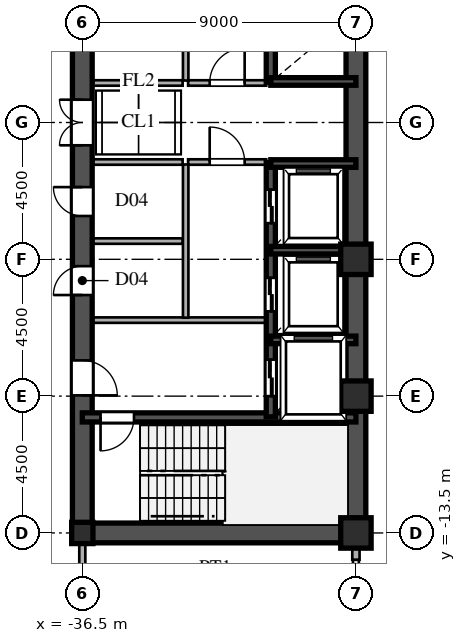
"""IFC4 building model, lengths in metres.
Left out: names, types, materials, properties, quantities, classifications, styles, units other than length and angle.
Written with IfcOpenShell. Run it as: python <this file> out.ifc"""

import sys

from ifc_helpers import new_model, si_unit, direction, frame, frame_2d, origin, origin_2d, place, context, subcontext, project, spatial, rectangle, hollow_rectangle, i_section, extrude, source, transform, mapped, element, fill, save


model = new_model("IFC4")
c1 = context("Model", 3, precision=1e-05, world=origin(), true_north=direction((0.0, 1.0)))
c2 = subcontext(c1, "Body", "Model", "MODEL_VIEW")
j1 = project(units=[si_unit("LENGTHUNIT", "METRE"), si_unit("PLANEANGLEUNIT", "RADIAN")], contexts=[c1])
p1 = place(None, origin())
s1 = spatial("IfcSite", under=j1, at=p1, CompositionType="ELEMENT")
p2 = place(p1, origin())
s2 = spatial("IfcBuilding", under=s1, at=p2, CompositionType="ELEMENT")
p3 = place(p2, frame((0.0, 0.0, 114.0)))
s3 = spatial("IfcBuildingStorey", under=s2, at=p3, CompositionType="ELEMENT", Elevation=114.0)
m1 = source(origin(), c2, "Body", "SweptSolid", [
    extrude(hollow_rectangle(XDim=1.0, YDim=1.0, WallThickness=0.042, at=origin_2d()), origin(), (0.0, 0.0, 1.0), 3.6),
])
for number, where, z_axis, x_axis in (
    (1, (-27.5, -13.5, 0.0), (0.0, 0.0, 1.0), (1.0, 0.0, 0.0)),
    (2, (-27.5, -9.0, 0.0), (0.0, 0.0, 1.0), (1.0, 0.0, 0.0)),
    (3, (-27.5, -4.5, 0.0), (0.0, 0.0, 1.0), (1.0, 0.0, 0.0)),
):
    element("IfcColumn", number, at=place(p3, frame(where, z_axis=z_axis, x_axis=x_axis)), inside=s3, PredefinedType="COLUMN", context=c2, shape_type="MappedRepresentation", body=[
        mapped(m1, transform((0.0, 0.0, 0.0), scale=1.0)),
    ])
m2 = source(origin(), c2, "Body", "SweptSolid", [
    extrude(i_section(OverallWidth=0.7, OverallDepth=0.7, WebThickness=0.028, FlangeThickness=0.045, at=origin_2d()), origin(), (0.0, 0.0, 1.0), 3.6),
])
p4 = place(p3, frame((-36.5, -13.5, 0.0), z_axis=(0.0, 0.0, 1.0), x_axis=(1.0, 0.0, 0.0)))
e4 = element("IfcColumn", 4, at=p4, inside=s3, PredefinedType="COLUMN", context=c2, shape_type="MappedRepresentation", body=[
    mapped(m2, transform((0.0, 0.0, 0.0), scale=1.0)),
])
p5 = place(p3, frame((-27.5, -14.38, 0.0), z_axis=(0.0, 0.0, 1.0), x_axis=(0.0, 1.0, 0.0)))
e5 = element("IfcWall", 5, at=p5, inside=s3, PredefinedType="SOLIDWALL", context=c2, shape_type="SweptSolid", body=[
    extrude(rectangle(XDim=0.55, YDim=0.24, at=frame_2d((0.275, 0.0))), origin(), (0.0, 0.0, 1.0), 2.88),
])
for number, where, z_axis, x_axis in (
    (6, (-27.5, -13.5, 0.0), (0.0, 0.0, 1.0), (0.0, 1.0, 0.0)),
    (7, (-27.5, 1.3, 0.0), (0.0, 0.0, 1.0), (0.0, 1.0, 0.0)),
):
    element("IfcWall", number, at=place(p3, frame(where, z_axis=z_axis, x_axis=x_axis)), inside=s3, PredefinedType="SHEAR", context=c2, shape_type="SweptSolid", body=[
        extrude(rectangle(XDim=12.2, YDim=0.65, at=frame_2d((6.1, 0.0))), origin(), (0.0, 0.0, 1.0), 3.38),
    ])
p6 = place(p3, frame((-27.5, -1.3, 0.0), z_axis=(0.0, 0.0, 1.0), x_axis=(0.0, 1.0, 0.0)))
e8 = element("IfcWall", 8, at=p6, inside=s3, PredefinedType="SHEAR", context=c2, shape_type="SweptSolid", body=[
    extrude(rectangle(XDim=2.6, YDim=0.65, at=frame_2d((1.3, 0.0))), origin(), (0.0, 0.0, 1.0), 3.38),
])
p7 = place(p3, frame((-36.5, -13.5, 0.0), z_axis=(0.0, 0.0, 1.0), x_axis=(1.0, 0.0, 0.0)))
e9 = element("IfcWall", 9, at=p7, inside=s3, PredefinedType="SHEAR", context=c2, shape_type="SweptSolid", body=[
    extrude(rectangle(XDim=9.0, YDim=0.65, at=frame_2d((4.5, 0.0))), origin(), (0.0, 0.0, 1.0), 3.38),
])
p8 = place(p3, frame((-36.5, -13.65, 0.0), z_axis=(0.0, 0.0, 1.0), x_axis=(0.0, 1.0, 0.0)))
e10 = element("IfcWall", 10, at=p8, inside=s3, PredefinedType="SHEAR", context=c2, shape_type="SweptSolid", body=[
    extrude(rectangle(XDim=7.15, YDim=0.65, at=frame_2d((3.575, 0.0))), origin(), (0.0, 0.0, 1.0), 3.38),
])
p9 = place(p8, frame((4.675, 0.0, 0.0)))
e11 = element("IfcOpeningElement", 11, at=p9, cuts=e10, PredefinedType="OPENING", context=c2, shape_type="SweptSolid", body=[
    extrude(rectangle(XDim=1.15, YDim=2.2, at=frame_2d((0.575, 1.1))), frame((0.0, 0.335, 0.0), z_axis=(0.0, -1.0, 0.0), x_axis=(1.0, 0.0, 0.0)), (0.0, 0.0, 1.0), 0.67),
])
p10 = place(p3, frame((-36.5, -1.3, 0.0), z_axis=(0.0, 0.0, 1.0), x_axis=(0.0, 1.0, 0.0)))
e12 = element("IfcWall", 12, at=p10, inside=s3, PredefinedType="SHEAR", context=c2, shape_type="SweptSolid", body=[
    extrude(rectangle(XDim=2.6, YDim=0.65, at=frame_2d((1.3, 0.0))), origin(), (0.0, 0.0, 1.0), 3.38),
])
p11 = place(p10, frame((0.55, 0.0, 0.0)))
e13 = element("IfcOpeningElement", 13, at=p11, cuts=e12, PredefinedType="OPENING", context=c2, shape_type="SweptSolid", body=[
    extrude(rectangle(XDim=1.5, YDim=2.3, at=frame_2d((0.75, 1.15))), frame((0.0, 0.335, 0.0), z_axis=(0.0, -1.0, 0.0), x_axis=(1.0, 0.0, 0.0)), (0.0, 0.0, 1.0), 0.67),
])
p12 = place(p3, frame((-36.5, -6.5, 0.0), z_axis=(0.0, 0.0, 1.0), x_axis=(0.0, 1.0, 0.0)))
e14 = element("IfcWall", 14, at=p12, inside=s3, PredefinedType="SHEAR", context=c2, shape_type="SweptSolid", body=[
    extrude(rectangle(XDim=2.6, YDim=0.65, at=frame_2d((1.3, 0.0))), origin(), (0.0, 0.0, 1.0), 3.38),
])
p13 = place(p12, frame((0.825, 0.0, 0.0)))
e15 = element("IfcOpeningElement", 15, at=p13, cuts=e14, PredefinedType="OPENING", context=c2, shape_type="SweptSolid", body=[
    extrude(rectangle(XDim=0.95, YDim=2.15, at=frame_2d((0.475, 1.075))), frame((0.0, 0.335, 0.0), z_axis=(0.0, -1.0, 0.0), x_axis=(1.0, 0.0, 0.0)), (0.0, 0.0, 1.0), 0.67),
])
p14 = place(p3, frame((-36.5, -3.9, 0.0), z_axis=(0.0, 0.0, 1.0), x_axis=(0.0, 1.0, 0.0)))
e16 = element("IfcWall", 16, at=p14, inside=s3, PredefinedType="SHEAR", context=c2, shape_type="SweptSolid", body=[
    extrude(rectangle(XDim=2.6, YDim=0.65, at=frame_2d((1.3, 0.0))), origin(), (0.0, 0.0, 1.0), 3.38),
])
p15 = place(p14, frame((0.825, 0.0, 0.0)))
e17 = element("IfcOpeningElement", 17, at=p15, cuts=e16, PredefinedType="OPENING", context=c2, shape_type="SweptSolid", body=[
    extrude(rectangle(XDim=0.95, YDim=2.15, at=frame_2d((0.475, 1.075))), frame((0.0, 0.335, 0.0), z_axis=(0.0, -1.0, 0.0), x_axis=(1.0, 0.0, 0.0)), (0.0, 0.0, 1.0), 0.67),
])
p16 = place(p3, frame((-36.5, 1.3, 0.0), z_axis=(0.0, 0.0, 1.0), x_axis=(0.0, 1.0, 0.0)))
e18 = element("IfcWall", 18, at=p16, inside=s3, PredefinedType="SHEAR", context=c2, shape_type="SweptSolid", body=[
    extrude(rectangle(XDim=3.45, YDim=0.65, at=frame_2d((1.725, 0.0))), origin(), (0.0, 0.0, 1.0), 3.38),
])
p17 = place(p16, frame((1.25, 0.0, 0.0)))
e19 = element("IfcOpeningElement", 19, at=p17, cuts=e18, PredefinedType="OPENING", context=c2, shape_type="SweptSolid", body=[
    extrude(rectangle(XDim=0.95, YDim=2.15, at=frame_2d((0.475, 1.075))), frame((0.0, 0.335, 0.0), z_axis=(0.0, -1.0, 0.0), x_axis=(1.0, 0.0, 0.0)), (0.0, 0.0, 1.0), 0.67),
])
p18 = place(p3, frame((-36.5, -9.7, 0.0), z_axis=(0.0, 0.0, 1.0), x_axis=(1.0, 0.0, 0.0)))
e20 = element("IfcWall", 20, at=p18, inside=s3, PredefinedType="SHEAR", context=c2, shape_type="SweptSolid", body=[
    extrude(rectangle(XDim=9.0, YDim=0.3, at=frame_2d((4.5, 0.0))), origin(), (0.0, 0.0, 1.0), 3.38),
])
p19 = place(p18, frame((0.6, 0.0, 0.0)))
e21 = element("IfcOpeningElement", 21, at=p19, cuts=e20, PredefinedType="OPENING", context=c2, shape_type="SweptSolid", body=[
    extrude(rectangle(XDim=1.1, YDim=2.2, at=frame_2d((0.55, 1.1))), frame((0.0, 0.16, 0.0), z_axis=(0.0, -1.0, 0.0), x_axis=(1.0, 0.0, 0.0)), (0.0, 0.0, 1.0), 0.32),
])
for number, where, z_axis, x_axis in (
    (22, (-30.3, -7.15, 0.0), (0.0, 0.0, 1.0), (1.0, 0.0, 0.0)),
    (23, (-30.3, -4.2, 0.0), (0.0, 0.0, 1.0), (1.0, 0.0, 0.0)),
    (24, (-30.3, -1.35, 0.0), (0.0, 0.0, 1.0), (1.0, 0.0, 0.0)),
    (25, (-30.3, 1.35, 0.0), (0.0, 0.0, 1.0), (1.0, 0.0, 0.0)),
):
    element("IfcWall", number, at=place(p3, frame(where, z_axis=z_axis, x_axis=x_axis)), inside=s3, PredefinedType="SHEAR", context=c2, shape_type="SweptSolid", body=[
        extrude(rectangle(XDim=2.8, YDim=0.25, at=frame_2d((1.4, 0.0))), origin(), (0.0, 0.0, 1.0), 3.38),
    ])
p20 = place(p3, frame((-30.3, -9.68, 0.0), z_axis=(0.0, 0.0, 1.0), x_axis=(0.0, 1.0, 0.0)))
e26 = element("IfcWall", 26, at=p20, inside=s3, PredefinedType="SHEAR", context=c2, shape_type="SweptSolid", body=[
    extrude(rectangle(XDim=2.56, YDim=0.3, at=frame_2d((1.28, 0.0))), origin(), (0.0, 0.0, 1.0), 3.38),
])
p21 = place(p20, frame((0.68, 0.0, 0.0)))
e27 = element("IfcOpeningElement", 27, at=p21, cuts=e26, PredefinedType="OPENING", context=c2, shape_type="SweptSolid", body=[
    extrude(rectangle(XDim=1.2, YDim=2.25, at=frame_2d((0.6, 1.125))), frame((0.0, 0.16, 0.0), z_axis=(0.0, -1.0, 0.0), x_axis=(1.0, 0.0, 0.0)), (0.0, 0.0, 1.0), 0.32),
])
p22 = place(p3, frame((-30.3, -7.12, 0.0), z_axis=(0.0, 0.0, 1.0), x_axis=(0.0, 1.0, 0.0)))
e28 = element("IfcWall", 28, at=p22, inside=s3, PredefinedType="SHEAR", context=c2, shape_type="SweptSolid", body=[
    extrude(rectangle(XDim=2.92, YDim=0.3, at=frame_2d((1.46, 0.0))), origin(), (0.0, 0.0, 1.0), 3.38),
])
p23 = place(p22, frame((0.91, 0.0, 0.0)))
e29 = element("IfcOpeningElement", 29, at=p23, cuts=e28, PredefinedType="OPENING", context=c2, shape_type="SweptSolid", body=[
    extrude(rectangle(XDim=1.1, YDim=2.2, at=frame_2d((0.55, 1.1))), frame((0.0, 0.16, 0.0), z_axis=(0.0, -1.0, 0.0), x_axis=(1.0, 0.0, 0.0)), (0.0, 0.0, 1.0), 0.32),
])
p24 = place(p3, frame((-30.3, -4.2, 0.0), z_axis=(0.0, 0.0, 1.0), x_axis=(0.0, 1.0, 0.0)))
e30 = element("IfcWall", 30, at=p24, inside=s3, PredefinedType="SHEAR", context=c2, shape_type="SweptSolid", body=[
    extrude(rectangle(XDim=2.88, YDim=0.3, at=frame_2d((1.44, 0.0))), origin(), (0.0, 0.0, 1.0), 3.38),
])
p25 = place(p24, frame((0.89, 0.0, 0.0)))
e31 = element("IfcOpeningElement", 31, at=p25, cuts=e30, PredefinedType="OPENING", context=c2, shape_type="SweptSolid", body=[
    extrude(rectangle(XDim=1.1, YDim=2.2, at=frame_2d((0.55, 1.1))), frame((0.0, 0.16, 0.0), z_axis=(0.0, -1.0, 0.0), x_axis=(1.0, 0.0, 0.0)), (0.0, 0.0, 1.0), 0.32),
])
p26 = place(p3, frame((-30.3, 1.32, 0.0), z_axis=(0.0, 0.0, 1.0), x_axis=(0.0, 1.0, 0.0)))
e32 = element("IfcWall", 32, at=p26, inside=s3, PredefinedType="SHEAR", context=c2, shape_type="SweptSolid", body=[
    extrude(rectangle(XDim=2.28, YDim=0.3, at=frame_2d((1.14, 0.0))), origin(), (0.0, 0.0, 1.0), 3.38),
])
p27 = place(p3, frame((-36.15, -6.5, 0.0), z_axis=(0.0, 0.0, 1.0), x_axis=(1.0, 0.0, 0.0)))
e33 = element("IfcWall", 33, at=p27, inside=s3, PredefinedType="PARTITIONING", context=c2, shape_type="SweptSolid", body=[
    extrude(rectangle(XDim=5.7, YDim=0.18, at=frame_2d((2.85, 0.0))), origin(), (0.0, 0.0, 1.0), 3.38),
])
p28 = place(p3, frame((-33.1, -6.42, 0.0), z_axis=(0.0, 0.0, 1.0), x_axis=(0.0, 1.0, 0.0)))
e34 = element("IfcWall", 34, at=p28, inside=s3, PredefinedType="PARTITIONING", context=c2, shape_type="SweptSolid", body=[
    extrude(rectangle(XDim=5.04, YDim=0.18, at=frame_2d((2.52, 0.0))), origin(), (0.0, 0.0, 1.0), 3.38),
])
p29 = place(p3, frame((-33.1, 1.38, 0.0), z_axis=(0.0, 0.0, 1.0), x_axis=(0.0, 1.0, 0.0)))
e35 = element("IfcWall", 35, at=p29, inside=s3, PredefinedType="PARTITIONING", context=c2, shape_type="SweptSolid", body=[
    extrude(rectangle(XDim=6.74, YDim=0.18, at=frame_2d((3.37, 0.0))), origin(), (0.0, 0.0, 1.0), 3.38),
])
p30 = place(p3, frame((-33.02, -1.3, 0.0), z_axis=(0.0, 0.0, 1.0), x_axis=(1.0, 0.0, 0.0)))
e36 = element("IfcWall", 36, at=p30, inside=s3, PredefinedType="PARTITIONING", context=c2, shape_type="SweptSolid", body=[
    extrude(rectangle(XDim=2.57, YDim=0.18, at=frame_2d((1.285, 0.0))), origin(), (0.0, 0.0, 1.0), 3.38),
])
p31 = place(p30, frame((0.71, 0.0, 0.0)))
e37 = element("IfcOpeningElement", 37, at=p31, cuts=e36, PredefinedType="OPENING", context=c2, shape_type="SweptSolid", body=[
    extrude(rectangle(XDim=1.15, YDim=2.2, at=frame_2d((0.575, 1.1))), frame((0.0, 0.1, 0.0), z_axis=(0.0, -1.0, 0.0), x_axis=(1.0, 0.0, 0.0)), (0.0, 0.0, 1.0), 0.2),
])
p32 = place(p3, frame((-33.02, 1.3, 0.0), z_axis=(0.0, 0.0, 1.0), x_axis=(1.0, 0.0, 0.0)))
e38 = element("IfcWall", 38, at=p32, inside=s3, PredefinedType="PARTITIONING", context=c2, shape_type="SweptSolid", body=[
    extrude(rectangle(XDim=2.57, YDim=0.18, at=frame_2d((1.285, 0.0))), origin(), (0.0, 0.0, 1.0), 3.38),
])
p33 = place(p32, frame((0.71, 0.0, 0.0)))
e39 = element("IfcOpeningElement", 39, at=p33, cuts=e38, PredefinedType="OPENING", context=c2, shape_type="SweptSolid", body=[
    extrude(rectangle(XDim=1.15, YDim=2.2, at=frame_2d((0.575, 1.1))), frame((0.0, 0.1, 0.0), z_axis=(0.0, -1.0, 0.0), x_axis=(1.0, 0.0, 0.0)), (0.0, 0.0, 1.0), 0.2),
])
for number, where, z_axis, x_axis in (
    (40, (-36.15, -1.3, 0.0), (0.0, 0.0, 1.0), (1.0, 0.0, 0.0)),
    (41, (-36.15, 1.3, 0.0), (0.0, 0.0, 1.0), (1.0, 0.0, 0.0)),
    (42, (-36.15, -3.9, 0.0), (0.0, 0.0, 1.0), (1.0, 0.0, 0.0)),
):
    element("IfcWall", number, at=place(p3, frame(where, z_axis=z_axis, x_axis=x_axis)), inside=s3, PredefinedType="PARTITIONING", context=c2, shape_type="SweptSolid", body=[
        extrude(rectangle(XDim=2.95, YDim=0.18, at=frame_2d((1.475, 0.0))), origin(), (0.0, 0.0, 1.0), 3.38),
    ])
p34 = place(p3, frame((-36.5, -15.515, 0.0), z_axis=(0.0, 0.0, 1.0), x_axis=(0.0, 1.0, 0.0)))
e43 = element("IfcWall", 43, at=p34, inside=s3, PredefinedType="PARTITIONING", context=c2, shape_type="SweptSolid", body=[
    extrude(rectangle(XDim=1.685, YDim=0.2, at=frame_2d((0.842, 0.0))), origin(), (0.0, 0.0, 1.0), 2.78),
])
m3 = source(origin(), c2, "Body", "SweptSolid", [
    extrude(rectangle(XDim=1.15, YDim=2.2, at=frame_2d((0.575, 1.1))), frame((0.0, 0.025, 0.0), z_axis=(0.0, -1.0, 0.0), x_axis=(1.0, 0.0, 0.0)), (0.0, 0.0, 1.0), 0.05),
])
p35 = place(p9, frame((1.15, 0.0, 0.0), z_axis=(0.0, 0.0, 1.0), x_axis=(-1.0, 0.0, 0.0)))
e44 = element("IfcDoor", 44, at=p35, inside=s3, OperationType="SINGLE_SWING_LEFT", PredefinedType="DOOR", context=c2, shape_type="MappedRepresentation", body=[
    mapped(m3, transform((0.0, 0.0, 0.0), scale=1.0)),
])
fill(e11, e44)
m4 = source(origin(), c2, "Body", "SweptSolid", [
    extrude(rectangle(XDim=1.5, YDim=2.3, at=frame_2d((0.75, 1.15))), frame((0.0, 0.025, 0.0), z_axis=(0.0, -1.0, 0.0), x_axis=(1.0, 0.0, 0.0)), (0.0, 0.0, 1.0), 0.05),
])
p36 = place(p11, origin())
e45 = element("IfcDoor", 45, at=p36, inside=s3, OperationType="DOUBLE_SWING_LEFT", PredefinedType="DOOR", context=c2, shape_type="MappedRepresentation", body=[
    mapped(m4, transform((0.0, 0.0, 0.0), scale=1.0)),
])
fill(e13, e45)
m5 = source(origin(), c2, "Body", "SweptSolid", [
    extrude(rectangle(XDim=0.95, YDim=2.15, at=frame_2d((0.475, 1.075))), frame((0.0, 0.025, 0.0), z_axis=(0.0, -1.0, 0.0), x_axis=(1.0, 0.0, 0.0)), (0.0, 0.0, 1.0), 0.05),
])
p37 = place(p13, origin())
e46 = element("IfcDoor", 46, at=p37, inside=s3, OperationType="SINGLE_SWING_LEFT", PredefinedType="DOOR", context=c2, shape_type="MappedRepresentation", body=[
    mapped(m5, transform((0.0, 0.0, 0.0), scale=1.0)),
])
fill(e15, e46)
p38 = place(p15, origin())
e47 = element("IfcDoor", 47, at=p38, inside=s3, OperationType="SINGLE_SWING_RIGHT", PredefinedType="DOOR", context=c2, shape_type="MappedRepresentation", body=[
    mapped(m5, transform((0.0, 0.0, 0.0), scale=1.0)),
])
fill(e17, e47)
m6 = source(origin(), c2, "Body", "SweptSolid", [
    extrude(rectangle(XDim=1.1, YDim=2.2, at=frame_2d((0.55, 1.1))), frame((0.0, 0.025, 0.0), z_axis=(0.0, -1.0, 0.0), x_axis=(1.0, 0.0, 0.0)), (0.0, 0.0, 1.0), 0.05),
])
p39 = place(p19, frame((1.1, 0.0, 0.0), z_axis=(0.0, 0.0, 1.0), x_axis=(-1.0, 0.0, 0.0)))
e48 = element("IfcDoor", 48, at=p39, inside=s3, OperationType="SINGLE_SWING_LEFT", PredefinedType="DOOR", context=c2, shape_type="MappedRepresentation", body=[
    mapped(m6, transform((0.0, 0.0, 0.0), scale=1.0)),
])
fill(e21, e48)
m7 = source(origin(), c2, "Body", "SweptSolid", [
    extrude(rectangle(XDim=1.2, YDim=2.25, at=frame_2d((0.6, 1.125))), frame((0.0, 0.025, 0.0), z_axis=(0.0, -1.0, 0.0), x_axis=(1.0, 0.0, 0.0)), (0.0, 0.0, 1.0), 0.05),
])
p40 = place(p21, origin())
e49 = element("IfcDoor", 49, at=p40, inside=s3, OperationType="DOUBLE_DOOR_SLIDING", PredefinedType="DOOR", context=c2, shape_type="MappedRepresentation", body=[
    mapped(m7, transform((0.0, 0.0, 0.0), scale=1.0)),
])
fill(e27, e49)
m8 = source(origin(), c2, "Body", "SweptSolid", [
    extrude(rectangle(XDim=1.1, YDim=2.2, at=frame_2d((0.55, 1.1))), frame((0.0, 0.025, 0.0), z_axis=(0.0, -1.0, 0.0), x_axis=(1.0, 0.0, 0.0)), (0.0, 0.0, 1.0), 0.05),
])
p41 = place(p23, origin())
e50 = element("IfcDoor", 50, at=p41, inside=s3, OperationType="DOUBLE_DOOR_SLIDING", PredefinedType="DOOR", context=c2, shape_type="MappedRepresentation", body=[
    mapped(m8, transform((0.0, 0.0, 0.0), scale=1.0)),
])
fill(e29, e50)
p42 = place(p25, origin())
e51 = element("IfcDoor", 51, at=p42, inside=s3, OperationType="DOUBLE_DOOR_SLIDING", PredefinedType="DOOR", context=c2, shape_type="MappedRepresentation", body=[
    mapped(m8, transform((0.0, 0.0, 0.0), scale=1.0)),
])
fill(e31, e51)
p43 = place(p31, origin())
e52 = element("IfcDoor", 52, at=p43, inside=s3, OperationType="SINGLE_SWING_LEFT", PredefinedType="DOOR", context=c2, shape_type="MappedRepresentation", body=[
    mapped(m3, transform((0.0, 0.0, 0.0), scale=1.0)),
])
fill(e37, e52)
p44 = place(p33, origin())
e53 = element("IfcDoor", 53, at=p44, inside=s3, OperationType="SINGLE_SWING_RIGHT", PredefinedType="DOOR", context=c2, shape_type="MappedRepresentation", body=[
    mapped(m3, transform((0.0, 0.0, 0.0), scale=1.0)),
])
fill(e39, e53)
save(model, sys.argv[1])
